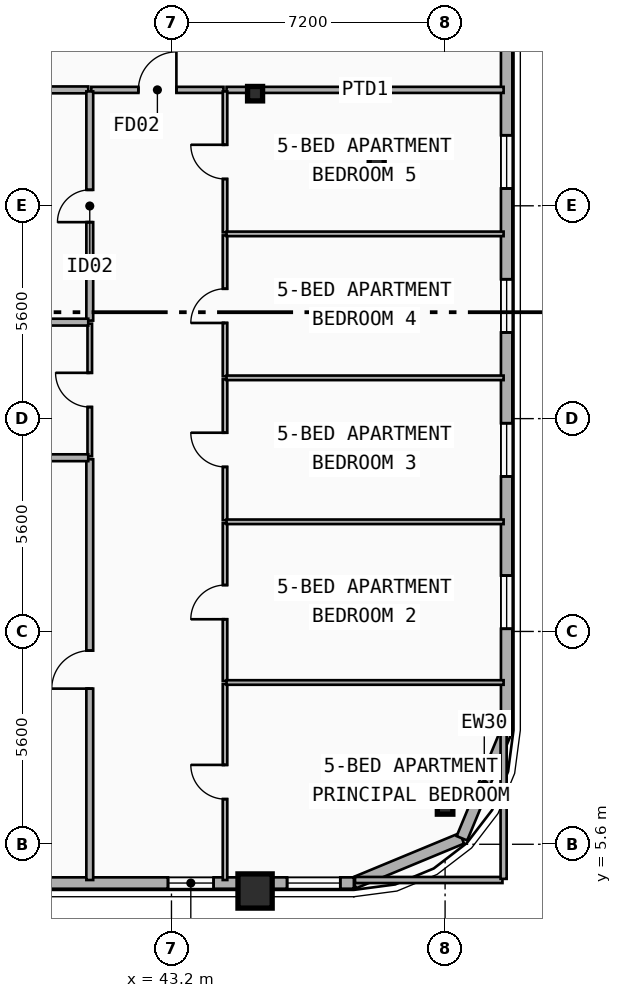
"""IFC4 building model, lengths in metres.
Left out: names, types, materials, properties, quantities, classifications, styles, units other than length and angle.
Written with IfcOpenShell. Run it as: python <this file> out.ifc"""

import sys

from ifc_helpers import new_model, si_unit, direction, frame, frame_2d, origin, origin_2d, place, context, subcontext, project, spatial, rectangle, i_section, extrude, element, fill, save


model = new_model("IFC4")
c1 = context("Model", 3, precision=1e-05, world=origin(), true_north=direction((0.0, 1.0)))
c2 = subcontext(c1, "Body", "Model", "MODEL_VIEW")
j1 = project(units=[si_unit("LENGTHUNIT", "METRE"), si_unit("PLANEANGLEUNIT", "RADIAN")], contexts=[c1])
p1 = place(None, origin())
s1 = spatial("IfcSite", under=j1, at=p1, CompositionType="ELEMENT")
p2 = place(p1, origin())
s2 = spatial("IfcBuilding", under=s1, at=p2, CompositionType="ELEMENT")
p3 = place(p2, frame((0.0, 0.0, 240.0)))
s3 = spatial("IfcBuildingStorey", under=s2, at=p3, CompositionType="ELEMENT", Elevation=240.0)
p4 = place(p3, frame((45.4, 25.35, 0.0), z_axis=(0.0, 0.0, 1.0), x_axis=(1.0, 0.0, 0.0)))
e1 = element("IfcColumn", 1, at=p4, inside=s3, PredefinedType="COLUMN", context=c2, shape_type="SweptSolid", body=[
    extrude(i_section(OverallWidth=0.395, OverallDepth=0.38, WebThickness=0.019, FlangeThickness=0.03, FilletRadius=0.015, at=origin_2d()), origin(), (0.0, 0.0, 1.0), 3.6),
])
p5 = place(p3, frame((45.4, 4.479, 0.0), z_axis=(0.0, -0.090298253426, 0.995914768154), x_axis=(1.0, 0.0, 0.0)))
e2 = element("IfcColumn", 2, at=p5, inside=s3, PredefinedType="COLUMN", context=c2, shape_type="SweptSolid", body=[
    extrude(rectangle(XDim=0.9, YDim=0.9, at=origin_2d()), origin(), (0.0, 0.0, 1.0), 3.615),
])
p6 = place(p3, frame((48.6, 23.6, 0.0), z_axis=(0.0, 0.0, 1.0), x_axis=(1.0, 0.0, 0.0)))
e3 = element("IfcColumn", 3, at=p6, inside=s3, PredefinedType="COLUMN", context=c2, shape_type="SweptSolid", body=[
    extrude(i_section(OverallWidth=0.395, OverallDepth=0.38, WebThickness=0.019, FlangeThickness=0.03, FilletRadius=0.015, at=origin_2d()), origin(), (0.0, 0.0, 1.0), 3.6),
])
p7 = place(p3, frame((50.4, 6.688, 0.0), z_axis=(0.0, -0.079901051777, 0.996802799918), x_axis=(1.0, 0.0, 0.0)))
e4 = element("IfcColumn", 4, at=p7, inside=s3, PredefinedType="COLUMN", context=c2, shape_type="SweptSolid", body=[
    extrude(i_section(OverallWidth=0.408, OverallDepth=0.4, WebThickness=0.025, FlangeThickness=0.039, FilletRadius=0.015, at=origin_2d()), origin(), (0.0, 0.0, 1.0), 3.612),
])
p8 = place(p3, frame((50.843, 5.757, 0.0), z_axis=(0.0, 0.0, 1.0), x_axis=(-0.92389884758, -0.382636798336, 0.0)))
e5 = element("IfcWall", 5, at=p8, inside=s3, PredefinedType="SOLIDWALL", context=c2, shape_type="SweptSolid", body=[
    extrude(rectangle(XDim=3.077, YDim=0.3, at=frame_2d((1.538, 0.0))), origin(), (0.0, 0.0, 1.0), 3.28),
])
p9 = place(p3, frame((52.02, 8.6, 0.0), z_axis=(0.0, 0.0, 1.0), x_axis=(-0.382676475685, -0.923882414032, 0.0)))
e6 = element("IfcWall", 6, at=p9, inside=s3, PredefinedType="SOLIDWALL", context=c2, shape_type="SweptSolid", body=[
    extrude(rectangle(XDim=3.077, YDim=0.3, at=frame_2d((1.539, 0.0))), origin(), (0.0, 0.0, 1.0), 3.28),
])
p10 = place(p3, frame((52.02, 37.2, 0.0), z_axis=(0.0, 0.0, 1.0), x_axis=(0.0, -1.0, 0.0)))
e7 = element("IfcWall", 7, at=p10, inside=s3, PredefinedType="SOLIDWALL", context=c2, shape_type="SweptSolid", body=[
    extrude(rectangle(XDim=28.6, YDim=0.3, at=frame_2d((14.3, 0.0))), origin(), (0.0, 0.0, 1.0), 3.28),
])
p11 = place(p10, frame((2.38, 0.0, 0.34)))
e8 = element("IfcOpeningElement", 8, at=p11, cuts=e7, PredefinedType="OPENING", context=c2, shape_type="SweptSolid", body=[
    extrude(rectangle(XDim=1.4, YDim=2.1, at=frame_2d((0.7, 1.05))), frame((0.0, 0.16, 0.0), z_axis=(0.0, -1.0, 0.0), x_axis=(1.0, 0.0, 0.0)), (0.0, 0.0, 1.0), 0.32),
])
p12 = place(p10, frame((5.84, 0.0, 0.34)))
e9 = element("IfcOpeningElement", 9, at=p12, cuts=e7, PredefinedType="OPENING", context=c2, shape_type="SweptSolid", body=[
    extrude(rectangle(XDim=1.4, YDim=2.1, at=frame_2d((0.7, 1.05))), frame((0.0, 0.16, 0.0), z_axis=(0.0, -1.0, 0.0), x_axis=(1.0, 0.0, 0.0)), (0.0, 0.0, 1.0), 0.32),
])
p13 = place(p10, frame((24.529, 0.0, 0.34)))
e10 = element("IfcOpeningElement", 10, at=p13, cuts=e7, PredefinedType="OPENING", context=c2, shape_type="SweptSolid", body=[
    extrude(rectangle(XDim=1.4, YDim=2.1, at=frame_2d((0.7, 1.05))), frame((0.0, 0.16, 0.0), z_axis=(0.0, -1.0, 0.0), x_axis=(1.0, 0.0, 0.0)), (0.0, 0.0, 1.0), 0.32),
])
p14 = place(p10, frame((20.521, 0.0, 0.34)))
e11 = element("IfcOpeningElement", 11, at=p14, cuts=e7, PredefinedType="OPENING", context=c2, shape_type="SweptSolid", body=[
    extrude(rectangle(XDim=1.4, YDim=2.1, at=frame_2d((0.7, 1.05))), frame((0.0, 0.16, 0.0), z_axis=(0.0, -1.0, 0.0), x_axis=(1.0, 0.0, 0.0)), (0.0, 0.0, 1.0), 0.32),
])
p15 = place(p10, frame((16.733, 0.0, 0.34)))
e12 = element("IfcOpeningElement", 12, at=p15, cuts=e7, PredefinedType="OPENING", context=c2, shape_type="SweptSolid", body=[
    extrude(rectangle(XDim=1.4, YDim=2.1, at=frame_2d((0.7, 1.05))), frame((0.0, 0.16, 0.0), z_axis=(0.0, -1.0, 0.0), x_axis=(1.0, 0.0, 0.0)), (0.0, 0.0, 1.0), 0.32),
])
p16 = place(p10, frame((12.945, 0.0, 0.34)))
e13 = element("IfcOpeningElement", 13, at=p16, cuts=e7, PredefinedType="OPENING", context=c2, shape_type="SweptSolid", body=[
    extrude(rectangle(XDim=1.4, YDim=2.1, at=frame_2d((0.7, 1.05))), frame((0.0, 0.16, 0.0), z_axis=(0.0, -1.0, 0.0), x_axis=(1.0, 0.0, 0.0)), (0.0, 0.0, 1.0), 0.32),
])
p17 = place(p3, frame((48.0, 4.58, 0.0), z_axis=(0.0, 0.0, 1.0), x_axis=(-1.0, 0.0, 0.0)))
e14 = element("IfcWall", 14, at=p17, inside=s3, PredefinedType="SOLIDWALL", context=c2, shape_type="SweptSolid", body=[
    extrude(rectangle(XDim=38.4, YDim=0.3, at=frame_2d((19.2, 0.0))), origin(), (0.0, 0.0, 1.0), 3.28),
])
p18 = place(p17, frame((33.595, 0.0, 0.34)))
e15 = element("IfcOpeningElement", 15, at=p18, cuts=e14, PredefinedType="OPENING", context=c2, shape_type="SweptSolid", body=[
    extrude(rectangle(XDim=1.4, YDim=1.8, at=frame_2d((0.7, 0.9))), frame((0.0, 0.16, 0.0), z_axis=(0.0, -1.0, 0.0), x_axis=(1.0, 0.0, 0.0)), (0.0, 0.0, 1.0), 0.32),
])
p19 = place(p17, frame((14.425, 0.0, 0.48)))
e16 = element("IfcOpeningElement", 16, at=p19, cuts=e14, PredefinedType="OPENING", context=c2, shape_type="SweptSolid", body=[
    extrude(rectangle(XDim=2.0, YDim=2.2, at=frame_2d((1.0, 1.1))), frame((0.0, 0.16, 0.0), z_axis=(0.0, -1.0, 0.0), x_axis=(1.0, 0.0, 0.0)), (0.0, 0.0, 1.0), 0.32),
])
p20 = place(p17, frame((3.691, 0.0, 1.22)))
e17 = element("IfcOpeningElement", 17, at=p20, cuts=e14, PredefinedType="OPENING", context=c2, shape_type="SweptSolid", body=[
    extrude(rectangle(XDim=1.2, YDim=1.5, at=frame_2d((0.6, 0.75))), frame((0.0, 0.16, 0.0), z_axis=(0.0, -1.0, 0.0), x_axis=(1.0, 0.0, 0.0)), (0.0, 0.0, 1.0), 0.32),
])
p21 = place(p17, frame((8.25, 0.0, 0.52)))
e18 = element("IfcOpeningElement", 18, at=p21, cuts=e14, PredefinedType="OPENING", context=c2, shape_type="SweptSolid", body=[
    extrude(rectangle(XDim=1.1, YDim=1.05, at=frame_2d((0.55, 0.525))), frame((0.0, 0.16, 0.0), z_axis=(0.0, -1.0, 0.0), x_axis=(1.0, 0.0, 0.0)), (0.0, 0.0, 1.0), 0.32),
])
p22 = place(p17, frame((0.357, 0.0, 0.75)))
e19 = element("IfcOpeningElement", 19, at=p22, cuts=e14, PredefinedType="OPENING", context=c2, shape_type="SweptSolid", body=[
    extrude(rectangle(XDim=1.4, YDim=1.8, at=frame_2d((0.7, 0.9))), frame((0.0, 0.16, 0.0), z_axis=(0.0, -1.0, 0.0), x_axis=(1.0, 0.0, 0.0)), (0.0, 0.0, 1.0), 0.32),
])
p23 = place(p3, frame((41.09, 25.45, 0.0), z_axis=(0.0, 0.0, 1.0), x_axis=(1.0, 0.0, 0.0)))
e20 = element("IfcWall", 20, at=p23, inside=s3, PredefinedType="PARTITIONING", context=c2, shape_type="SweptSolid", body=[
    extrude(rectangle(XDim=3.479, YDim=0.16, at=frame_2d((1.74, 0.0))), origin(), (0.0, 0.0, 1.0), 3.28),
])
p24 = place(p23, frame((1.24, 0.0, 0.0)))
e21 = element("IfcOpeningElement", 21, at=p24, cuts=e20, PredefinedType="OPENING", context=c2, shape_type="SweptSolid", body=[
    extrude(rectangle(XDim=1.0, YDim=2.15, at=frame_2d((0.5, 1.075))), frame((0.0, 0.09, 0.0), z_axis=(0.0, -1.0, 0.0), x_axis=(1.0, 0.0, 0.0)), (0.0, 0.0, 1.0), 0.18),
])
p25 = place(p3, frame((38.39, 25.45, 0.0), z_axis=(0.0, 0.0, 1.0), x_axis=(1.0, 0.0, 0.0)))
e22 = element("IfcWall", 22, at=p25, inside=s3, PredefinedType="PLUMBINGWALL", context=c2, shape_type="SweptSolid", body=[
    extrude(rectangle(XDim=2.62, YDim=0.18, at=frame_2d((1.31, 0.0))), origin(), (0.0, 0.0, 1.0), 3.28),
])
p26 = place(p3, frame((44.649, 25.45, 0.0), z_axis=(0.0, 0.0, 1.0), x_axis=(1.0, 0.0, 0.0)))
e23 = element("IfcWall", 23, at=p26, inside=s3, PredefinedType="PARTITIONING", context=c2, shape_type="SweptSolid", body=[
    extrude(rectangle(XDim=7.291, YDim=0.16, at=frame_2d((3.646, 0.0))), origin(), (0.0, 0.0, 1.0), 2.56),
])
p27 = place(p3, frame((41.05, 4.66, 0.0), z_axis=(0.0, 0.0, 1.0), x_axis=(0.0, 1.0, 0.0)))
e24 = element("IfcWall", 24, at=p27, inside=s3, PredefinedType="PLUMBINGWALL", context=c2, shape_type="SweptSolid", body=[
    extrude(rectangle(XDim=11.071, YDim=0.18, at=frame_2d((5.536, 0.0))), origin(), (0.0, 0.0, 1.0), 2.71),
])
p28 = place(p27, frame((5.035, 0.0, 0.0)))
e25 = element("IfcOpeningElement", 25, at=p28, cuts=e24, PredefinedType="OPENING", context=c2, shape_type="SweptSolid", body=[
    extrude(rectangle(XDim=1.0, YDim=2.15, at=frame_2d((0.5, 1.075))), frame((0.0, 0.1, 0.0), z_axis=(0.0, -1.0, 0.0), x_axis=(1.0, 0.0, 0.0)), (0.0, 0.0, 1.0), 0.2),
])
p29 = place(p3, frame((41.05, 15.811, 0.0), z_axis=(0.0, 0.0, 1.0), x_axis=(0.0, 1.0, 0.0)))
e26 = element("IfcWall", 26, at=p29, inside=s3, PredefinedType="PARTITIONING", context=c2, shape_type="SweptSolid", body=[
    extrude(rectangle(XDim=3.488, YDim=0.12, at=frame_2d((1.744, 0.0))), origin(), (0.0, 0.0, 1.0), 2.71),
])
p30 = place(p29, frame((1.294, 0.0, 0.0)))
e27 = element("IfcOpeningElement", 27, at=p30, cuts=e26, PredefinedType="OPENING", context=c2, shape_type="SweptSolid", body=[
    extrude(rectangle(XDim=0.9, YDim=2.1, at=frame_2d((0.45, 1.05))), frame((0.0, 0.07, 0.0), z_axis=(0.0, -1.0, 0.0), x_axis=(1.0, 0.0, 0.0)), (0.0, 0.0, 1.0), 0.14),
])
p31 = place(p3, frame((41.05, 19.379, 0.0), z_axis=(0.0, 0.0, 1.0), x_axis=(0.0, 1.0, 0.0)))
e28 = element("IfcWall", 28, at=p31, inside=s3, PredefinedType="PLUMBINGWALL", context=c2, shape_type="SweptSolid", body=[
    extrude(rectangle(XDim=6.031, YDim=0.18, at=frame_2d((3.016, 0.0))), origin(), (0.0, 0.0, 1.0), 2.71),
])
p32 = place(p31, frame((2.591, 0.0, 0.0)))
e29 = element("IfcOpeningElement", 29, at=p32, cuts=e28, PredefinedType="OPENING", context=c2, shape_type="SweptSolid", body=[
    extrude(rectangle(XDim=0.85, YDim=2.1, at=frame_2d((0.425, 1.05))), frame((0.0, 0.1, 0.0), z_axis=(0.0, -1.0, 0.0), x_axis=(1.0, 0.0, 0.0)), (0.0, 0.0, 1.0), 0.2),
])
p33 = place(p3, frame((44.609, 4.66, 0.0), z_axis=(0.0, 0.0, 1.0), x_axis=(0.0, 1.0, 0.0)))
e30 = element("IfcWall", 30, at=p33, inside=s3, PredefinedType="PARTITIONING", context=c2, shape_type="SweptSolid", body=[
    extrude(rectangle(XDim=5.157, YDim=0.12, at=frame_2d((2.579, 0.0))), origin(), (0.0, 0.0, 1.0), 2.87),
])
p34 = place(p33, frame((2.128, 0.0, 0.0)))
e31 = element("IfcOpeningElement", 31, at=p34, cuts=e30, PredefinedType="OPENING", context=c2, shape_type="SweptSolid", body=[
    extrude(rectangle(XDim=0.9, YDim=2.1, at=frame_2d((0.45, 1.05))), frame((0.0, 0.07, 0.0), z_axis=(0.0, -1.0, 0.0), x_axis=(1.0, 0.0, 0.0)), (0.0, 0.0, 1.0), 0.14),
])
p35 = place(p3, frame((44.609, 9.897, 0.0), z_axis=(0.0, 0.0, 1.0), x_axis=(0.0, 1.0, 0.0)))
e32 = element("IfcWall", 32, at=p35, inside=s3, PredefinedType="PARTITIONING", context=c2, shape_type="SweptSolid", body=[
    extrude(rectangle(XDim=4.148, YDim=0.12, at=frame_2d((2.074, 0.0))), origin(), (0.0, 0.0, 1.0), 2.71),
])
p36 = place(p35, frame((1.624, 0.0, 0.0)))
e33 = element("IfcOpeningElement", 33, at=p36, cuts=e32, PredefinedType="OPENING", context=c2, shape_type="SweptSolid", body=[
    extrude(rectangle(XDim=0.9, YDim=2.1, at=frame_2d((0.45, 1.05))), frame((0.0, 0.07, 0.0), z_axis=(0.0, -1.0, 0.0), x_axis=(1.0, 0.0, 0.0)), (0.0, 0.0, 1.0), 0.14),
])
p37 = place(p3, frame((44.609, 14.125, 0.0), z_axis=(0.0, 0.0, 1.0), x_axis=(0.0, 1.0, 0.0)))
e34 = element("IfcWall", 34, at=p37, inside=s3, PredefinedType="PARTITIONING", context=c2, shape_type="SweptSolid", body=[
    extrude(rectangle(XDim=3.708, YDim=0.12, at=frame_2d((1.854, 0.0))), origin(), (0.0, 0.0, 1.0), 2.87),
])
p38 = place(p37, frame((1.404, 0.0, 0.0)))
e35 = element("IfcOpeningElement", 35, at=p38, cuts=e34, PredefinedType="OPENING", context=c2, shape_type="SweptSolid", body=[
    extrude(rectangle(XDim=0.9, YDim=2.1, at=frame_2d((0.45, 1.05))), frame((0.0, 0.07, 0.0), z_axis=(0.0, -1.0, 0.0), x_axis=(1.0, 0.0, 0.0)), (0.0, 0.0, 1.0), 0.14),
])
p39 = place(p3, frame((44.609, 17.913, 0.0), z_axis=(0.0, 0.0, 1.0), x_axis=(0.0, 1.0, 0.0)))
e36 = element("IfcWall", 36, at=p39, inside=s3, PredefinedType="PARTITIONING", context=c2, shape_type="SweptSolid", body=[
    extrude(rectangle(XDim=3.708, YDim=0.12, at=frame_2d((1.854, 0.0))), origin(), (0.0, 0.0, 1.0), 2.71),
])
p40 = place(p39, frame((1.404, 0.0, 0.0)))
e37 = element("IfcOpeningElement", 37, at=p40, cuts=e36, PredefinedType="OPENING", context=c2, shape_type="SweptSolid", body=[
    extrude(rectangle(XDim=0.9, YDim=2.1, at=frame_2d((0.45, 1.05))), frame((0.0, 0.07, 0.0), z_axis=(0.0, -1.0, 0.0), x_axis=(1.0, 0.0, 0.0)), (0.0, 0.0, 1.0), 0.14),
])
p41 = place(p3, frame((44.609, 21.701, 0.0), z_axis=(0.0, 0.0, 1.0), x_axis=(0.0, 1.0, 0.0)))
e38 = element("IfcWall", 38, at=p41, inside=s3, PredefinedType="PARTITIONING", context=c2, shape_type="SweptSolid", body=[
    extrude(rectangle(XDim=3.709, YDim=0.12, at=frame_2d((1.854, 0.0))), origin(), (0.0, 0.0, 1.0), 2.87),
])
p42 = place(p41, frame((1.405, 0.0, 0.0)))
e39 = element("IfcOpeningElement", 39, at=p42, cuts=e38, PredefinedType="OPENING", context=c2, shape_type="SweptSolid", body=[
    extrude(rectangle(XDim=0.9, YDim=2.1, at=frame_2d((0.45, 1.05))), frame((0.0, 0.07, 0.0), z_axis=(0.0, -1.0, 0.0), x_axis=(1.0, 0.0, 0.0)), (0.0, 0.0, 1.0), 0.14),
])
p43 = place(p3, frame((38.39, 15.771, 0.0), z_axis=(0.0, 0.0, 1.0), x_axis=(1.0, 0.0, 0.0)))
e40 = element("IfcWall", 40, at=p43, inside=s3, PredefinedType="PLUMBINGWALL", context=c2, shape_type="SweptSolid", body=[
    extrude(rectangle(XDim=2.62, YDim=0.18, at=frame_2d((1.31, 0.0))), origin(), (0.0, 0.0, 1.0), 2.87),
])
p44 = place(p3, frame((38.39, 19.339, 0.0), z_axis=(0.0, 0.0, 1.0), x_axis=(1.0, 0.0, 0.0)))
e41 = element("IfcWall", 41, at=p44, inside=s3, PredefinedType="PLUMBINGWALL", context=c2, shape_type="SweptSolid", body=[
    extrude(rectangle(XDim=2.62, YDim=0.18, at=frame_2d((1.31, 0.0))), origin(), (0.0, 0.0, 1.0), 2.71),
])
for number, where, z_axis, x_axis in (
    (42, (44.649, 9.857, 0.0), (0.0, 0.0, 1.0), (1.0, 0.0, 0.0)),
    (43, (44.649, 14.085, 0.0), (0.0, 0.0, 1.0), (1.0, 0.0, 0.0)),
    (44, (44.649, 17.873, 0.0), (0.0, 0.0, 1.0), (1.0, 0.0, 0.0)),
    (45, (44.649, 21.661, 0.0), (0.0, 0.0, 1.0), (1.0, 0.0, 0.0)),
):
    element("IfcWall", number, at=place(p3, frame(where, z_axis=z_axis, x_axis=x_axis)), inside=s3, PredefinedType="PARTITIONING", context=c2, shape_type="SweptSolid", body=[
        extrude(rectangle(XDim=7.291, YDim=0.12, at=frame_2d((3.646, 0.0))), origin(), (0.0, 0.0, 1.0), 2.56),
    ])
p45 = place(p3, frame((48.03, 4.66, 0.0), z_axis=(0.0, 0.0, 1.0), x_axis=(1.0, 0.0, 0.0)))
e46 = element("IfcWall", 46, at=p45, inside=s3, PredefinedType="PARTITIONING", context=c2, shape_type="SweptSolid", body=[
    extrude(rectangle(XDim=3.88, YDim=0.16, at=frame_2d((1.94, 0.0))), origin(), (0.0, 0.0, 1.0), 3.28),
])
p46 = place(p3, frame((51.94, 4.69, 0.0), z_axis=(0.0, 0.0, 1.0), x_axis=(0.0, 1.0, 0.0)))
e47 = element("IfcWall", 47, at=p46, inside=s3, PredefinedType="PARTITIONING", context=c2, shape_type="SweptSolid", body=[
    extrude(rectangle(XDim=3.88, YDim=0.16, at=frame_2d((1.94, 0.0))), origin(), (0.0, 0.0, 1.0), 3.28),
])
p47 = place(p13, origin())
e48 = element("IfcWindow", 48, at=p47, inside=s3, PartitioningType="SINGLE_PANEL", PredefinedType="WINDOW", context=c2, shape_type="SweptSolid", body=[
    extrude(rectangle(XDim=1.4, YDim=2.1, at=frame_2d((0.7, 1.05))), frame((0.0, 0.03, 0.0), z_axis=(0.0, -1.0, 0.0), x_axis=(1.0, 0.0, 0.0)), (0.0, 0.0, 1.0), 0.06),
])
fill(e10, e48)
p48 = place(p14, origin())
e49 = element("IfcWindow", 49, at=p48, inside=s3, PartitioningType="SINGLE_PANEL", PredefinedType="WINDOW", context=c2, shape_type="SweptSolid", body=[
    extrude(rectangle(XDim=1.4, YDim=2.1, at=frame_2d((0.7, 1.05))), frame((0.0, 0.03, 0.0), z_axis=(0.0, -1.0, 0.0), x_axis=(1.0, 0.0, 0.0)), (0.0, 0.0, 1.0), 0.06),
])
fill(e11, e49)
p49 = place(p15, origin())
e50 = element("IfcWindow", 50, at=p49, inside=s3, PartitioningType="SINGLE_PANEL", PredefinedType="WINDOW", context=c2, shape_type="SweptSolid", body=[
    extrude(rectangle(XDim=1.4, YDim=2.1, at=frame_2d((0.7, 1.05))), frame((0.0, 0.03, 0.0), z_axis=(0.0, -1.0, 0.0), x_axis=(1.0, 0.0, 0.0)), (0.0, 0.0, 1.0), 0.06),
])
fill(e12, e50)
p50 = place(p16, origin())
e51 = element("IfcWindow", 51, at=p50, inside=s3, PartitioningType="SINGLE_PANEL", PredefinedType="WINDOW", context=c2, shape_type="SweptSolid", body=[
    extrude(rectangle(XDim=1.4, YDim=2.1, at=frame_2d((0.7, 1.05))), frame((0.0, 0.03, 0.0), z_axis=(0.0, -1.0, 0.0), x_axis=(1.0, 0.0, 0.0)), (0.0, 0.0, 1.0), 0.06),
])
fill(e13, e51)
p51 = place(p20, origin())
e52 = element("IfcWindow", 52, at=p51, inside=s3, PartitioningType="SINGLE_PANEL", PredefinedType="WINDOW", context=c2, shape_type="SweptSolid", body=[
    extrude(rectangle(XDim=1.2, YDim=1.5, at=frame_2d((0.6, 0.75))), frame((0.0, 0.03, 0.0), z_axis=(0.0, -1.0, 0.0), x_axis=(1.0, 0.0, 0.0)), (0.0, 0.0, 1.0), 0.06),
])
fill(e17, e52)
p52 = place(p22, origin())
e53 = element("IfcWindow", 53, at=p52, inside=s3, PartitioningType="SINGLE_PANEL", PredefinedType="WINDOW", context=c2, shape_type="SweptSolid", body=[
    extrude(rectangle(XDim=1.4, YDim=1.8, at=frame_2d((0.7, 0.9))), frame((0.0, 0.03, 0.0), z_axis=(0.0, -1.0, 0.0), x_axis=(1.0, 0.0, 0.0)), (0.0, 0.0, 1.0), 0.06),
])
fill(e19, e53)
p53 = place(p24, origin())
e54 = element("IfcDoor", 54, at=p53, inside=s3, OperationType="SINGLE_SWING_RIGHT", PredefinedType="DOOR", context=c2, shape_type="SweptSolid", body=[
    extrude(rectangle(XDim=1.0, YDim=2.15, at=frame_2d((0.5, 1.075))), frame((0.0, 0.025, 0.0), z_axis=(0.0, -1.0, 0.0), x_axis=(1.0, 0.0, 0.0)), (0.0, 0.0, 1.0), 0.05),
])
fill(e21, e54)
p54 = place(p28, origin())
e55 = element("IfcDoor", 55, at=p54, inside=s3, OperationType="SINGLE_SWING_LEFT", PredefinedType="DOOR", context=c2, shape_type="SweptSolid", body=[
    extrude(rectangle(XDim=1.0, YDim=2.15, at=frame_2d((0.5, 1.075))), frame((0.0, 0.025, 0.0), z_axis=(0.0, -1.0, 0.0), x_axis=(1.0, 0.0, 0.0)), (0.0, 0.0, 1.0), 0.05),
])
fill(e25, e55)
p55 = place(p30, origin())
e56 = element("IfcDoor", 56, at=p55, inside=s3, OperationType="SINGLE_SWING_RIGHT", PredefinedType="DOOR", context=c2, shape_type="SweptSolid", body=[
    extrude(rectangle(XDim=0.9, YDim=2.1, at=frame_2d((0.45, 1.05))), frame((0.0, 0.025, 0.0), z_axis=(0.0, -1.0, 0.0), x_axis=(1.0, 0.0, 0.0)), (0.0, 0.0, 1.0), 0.05),
])
fill(e27, e56)
p56 = place(p32, origin())
e57 = element("IfcDoor", 57, at=p56, inside=s3, OperationType="SINGLE_SWING_LEFT", PredefinedType="DOOR", context=c2, shape_type="SweptSolid", body=[
    extrude(rectangle(XDim=0.85, YDim=2.1, at=frame_2d((0.425, 1.05))), frame((0.0, 0.025, 0.0), z_axis=(0.0, -1.0, 0.0), x_axis=(1.0, 0.0, 0.0)), (0.0, 0.0, 1.0), 0.05),
])
fill(e29, e57)
p57 = place(p34, origin())
e58 = element("IfcDoor", 58, at=p57, inside=s3, OperationType="SINGLE_SWING_RIGHT", PredefinedType="DOOR", context=c2, shape_type="SweptSolid", body=[
    extrude(rectangle(XDim=0.9, YDim=2.1, at=frame_2d((0.45, 1.05))), frame((0.0, 0.025, 0.0), z_axis=(0.0, -1.0, 0.0), x_axis=(1.0, 0.0, 0.0)), (0.0, 0.0, 1.0), 0.05),
])
fill(e31, e58)
p58 = place(p36, origin())
e59 = element("IfcDoor", 59, at=p58, inside=s3, OperationType="SINGLE_SWING_LEFT", PredefinedType="DOOR", context=c2, shape_type="SweptSolid", body=[
    extrude(rectangle(XDim=0.9, YDim=2.1, at=frame_2d((0.45, 1.05))), frame((0.0, 0.025, 0.0), z_axis=(0.0, -1.0, 0.0), x_axis=(1.0, 0.0, 0.0)), (0.0, 0.0, 1.0), 0.05),
])
fill(e33, e59)
p59 = place(p38, origin())
e60 = element("IfcDoor", 60, at=p59, inside=s3, OperationType="SINGLE_SWING_RIGHT", PredefinedType="DOOR", context=c2, shape_type="SweptSolid", body=[
    extrude(rectangle(XDim=0.9, YDim=2.1, at=frame_2d((0.45, 1.05))), frame((0.0, 0.025, 0.0), z_axis=(0.0, -1.0, 0.0), x_axis=(1.0, 0.0, 0.0)), (0.0, 0.0, 1.0), 0.05),
])
fill(e35, e60)
p60 = place(p40, origin())
e61 = element("IfcDoor", 61, at=p60, inside=s3, OperationType="SINGLE_SWING_LEFT", PredefinedType="DOOR", context=c2, shape_type="SweptSolid", body=[
    extrude(rectangle(XDim=0.9, YDim=2.1, at=frame_2d((0.45, 1.05))), frame((0.0, 0.025, 0.0), z_axis=(0.0, -1.0, 0.0), x_axis=(1.0, 0.0, 0.0)), (0.0, 0.0, 1.0), 0.05),
])
fill(e37, e61)
p61 = place(p42, origin())
e62 = element("IfcDoor", 62, at=p61, inside=s3, OperationType="SINGLE_SWING_RIGHT", PredefinedType="DOOR", context=c2, shape_type="SweptSolid", body=[
    extrude(rectangle(XDim=0.9, YDim=2.1, at=frame_2d((0.45, 1.05))), frame((0.0, 0.025, 0.0), z_axis=(0.0, -1.0, 0.0), x_axis=(1.0, 0.0, 0.0)), (0.0, 0.0, 1.0), 0.05),
])
fill(e39, e62)
save(model, sys.argv[1])
